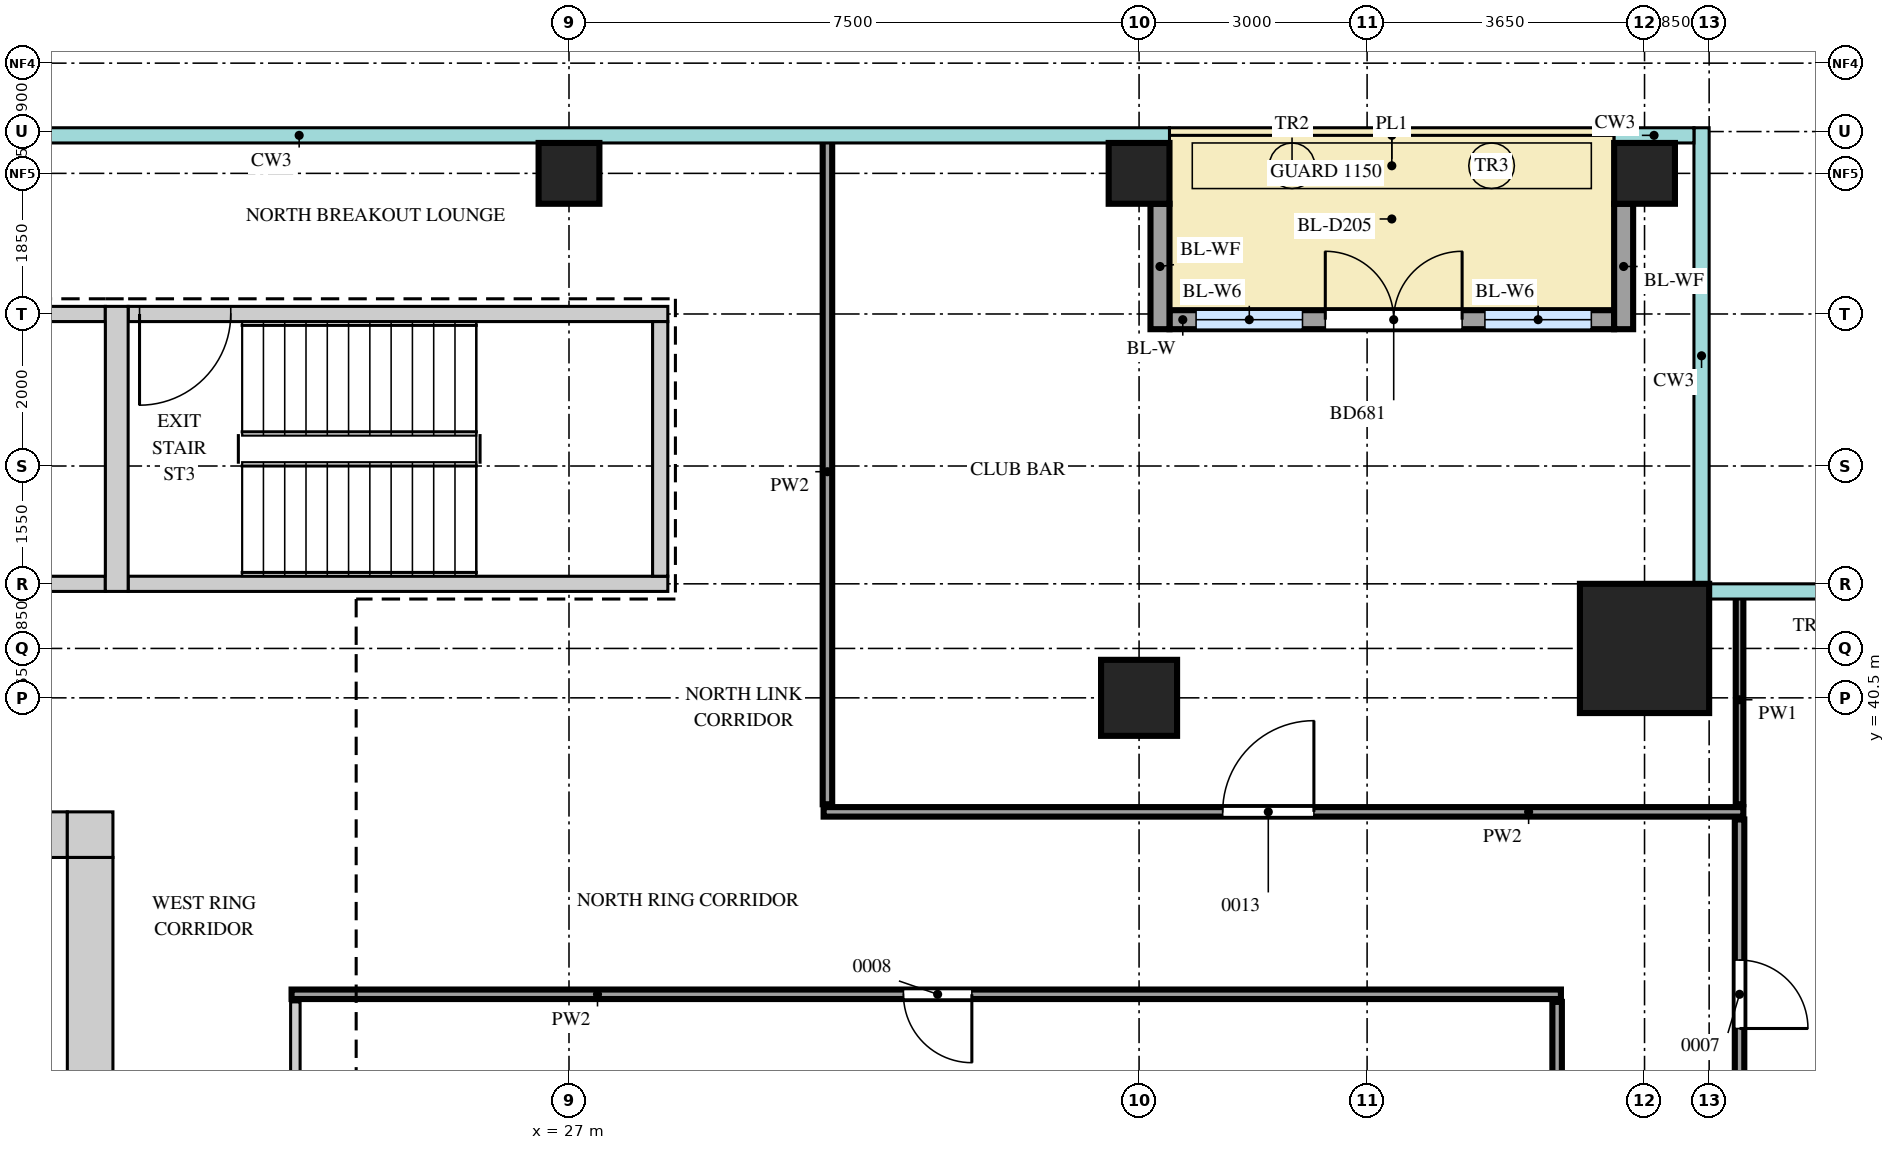
"""IFC4 building model, lengths in metres.
Left out: names, types, materials, properties, quantities, classifications, styles, units other than length and angle.
Written with IfcOpenShell. Run it as: python <this file> out.ifc"""

import sys

from ifc_helpers import new_model, si_unit, direction, frame, frame_2d, origin, origin_2d, place, context, subcontext, project, spatial, rectangle, extrude, source, transform, mapped, element, fill, save


model = new_model("IFC4")
c1 = context("Model", 3, precision=1e-05, world=origin(), true_north=direction((0.0, 1.0)))
c2 = subcontext(c1, "Body", "Model", "MODEL_VIEW")
j1 = project(units=[si_unit("LENGTHUNIT", "METRE"), si_unit("PLANEANGLEUNIT", "RADIAN")], contexts=[c1])
p1 = place(None, origin())
s1 = spatial("IfcSite", under=j1, at=p1, CompositionType="ELEMENT")
p2 = place(p1, origin())
s2 = spatial("IfcBuilding", under=s1, at=p2, CompositionType="ELEMENT")
p3 = place(p2, frame((0.0, 0.0, 302.2)))
s3 = spatial("IfcBuildingStorey", under=s2, at=p3, CompositionType="ELEMENT", Elevation=302.2)
m1 = source(origin(), c2, "Body", "SweptSolid", [
    extrude(rectangle(XDim=14.4, YDim=0.6, at=frame_2d((7.2, 0.0))), origin(), (0.0, 0.0, 1.0), 3.75),
])
p4 = place(p3, frame((6.0, 38.7, 0.0), z_axis=(0.0, 0.0, 1.0), x_axis=(1.0, 0.0, 0.0)))
e1 = element("IfcWall", 1, at=p4, inside=s3, PredefinedType="SHEAR", context=c2, shape_type="MappedRepresentation", body=[
    mapped(m1, transform((0.0, 0.0, 0.0))),
])
m2 = source(origin(), c2, "Body", "SweptSolid", [
    extrude(rectangle(XDim=0.9, YDim=2.1, at=frame_2d((0.45, 1.05))), frame((0.0, 0.31, 0.0), z_axis=(0.0, -1.0, 0.0), x_axis=(1.0, 0.0, 0.0)), (0.0, 0.0, 1.0), 0.62),
])
p5 = place(p4, frame((3.7, 0.0, 0.0)))
e2 = element("IfcOpeningElement", 2, at=p5, cuts=e1, PredefinedType="OPENING", context=c2, shape_type="MappedRepresentation", body=[
    mapped(m2, transform((0.0, 0.0, 0.0))),
])
p6 = place(p4, frame((8.7, 0.0, 0.0)))
e3 = element("IfcOpeningElement", 3, at=p6, cuts=e1, PredefinedType="OPENING", context=c2, shape_type="MappedRepresentation", body=[
    mapped(m2, transform((0.0, 0.0, 0.0))),
])
p7 = place(p4, frame((12.05, 0.0, 0.0)))
e4 = element("IfcOpeningElement", 4, at=p7, cuts=e1, PredefinedType="OPENING", context=c2, shape_type="MappedRepresentation", body=[
    mapped(m2, transform((0.0, 0.0, 0.0))),
])
m3 = source(origin(), c2, "Body", "SweptSolid", [
    extrude(rectangle(XDim=0.6, YDim=0.6, at=frame_2d((0.3, 0.0))), origin(), (0.0, 0.0, 1.0), 3.75),
])
p8 = place(p3, frame((20.4, 38.7, 0.0), z_axis=(0.0, 0.0, 1.0), x_axis=(1.0, 0.0, 0.0)))
e5 = element("IfcWall", 5, at=p8, inside=s3, PredefinedType="SHEAR", context=c2, shape_type="MappedRepresentation", body=[
    mapped(m3, transform((0.0, 0.0, 0.0))),
])
m4 = source(origin(), c2, "Body", "SweptSolid", [
    extrude(rectangle(XDim=22.8, YDim=0.6, at=frame_2d((11.4, 0.0))), origin(), (0.0, 0.0, 1.0), 3.75),
])
p9 = place(p3, frame((20.7, 15.6, 0.0), z_axis=(0.0, 0.0, 1.0), x_axis=(0.0, 1.0, 0.0)))
e6 = element("IfcWall", 6, at=p9, inside=s3, PredefinedType="SHEAR", context=c2, shape_type="MappedRepresentation", body=[
    mapped(m4, transform((0.0, 0.0, 0.0))),
])
m5 = source(origin(), c2, "Body", "SweptSolid", [
    extrude(rectangle(XDim=1.8, YDim=2.1, at=frame_2d((0.9, 1.05))), frame((0.0, 0.31, 0.0), z_axis=(0.0, -1.0, 0.0), x_axis=(1.0, 0.0, 0.0)), (0.0, 0.0, 1.0), 0.62),
])
p10 = place(p9, frame((10.9, 0.0, 0.0)))
e7 = element("IfcOpeningElement", 7, at=p10, cuts=e6, PredefinedType="OPENING", context=c2, shape_type="MappedRepresentation", body=[
    mapped(m5, transform((0.0, 0.0, 0.0))),
])
p11 = place(p9, frame((0.55, 0.0, 0.0)))
e8 = element("IfcOpeningElement", 8, at=p11, cuts=e6, PredefinedType="OPENING", context=c2, shape_type="MappedRepresentation", body=[
    mapped(m2, transform((0.0, 0.0, 0.0))),
])
p12 = place(p9, frame((4.1, 0.0, 0.0)))
e9 = element("IfcOpeningElement", 9, at=p12, cuts=e6, PredefinedType="OPENING", context=c2, shape_type="MappedRepresentation", body=[
    mapped(m2, transform((0.0, 0.0, 0.0))),
])
m6 = source(origin(), c2, "Body", "SweptSolid", [
    extrude(rectangle(XDim=7.0, YDim=0.2, at=frame_2d((3.5, 0.0))), origin(), (0.0, 0.0, 1.0), 3.75),
])
p13 = place(p3, frame((13.9, 45.55, 0.0), z_axis=(0.0, 0.0, 1.0), x_axis=(1.0, 0.0, 0.0)))
e10 = element("IfcWall", 10, at=p13, inside=s3, PredefinedType="SHEAR", context=c2, shape_type="MappedRepresentation", body=[
    mapped(m6, transform((0.0, 0.0, 0.0))),
])
m7 = source(origin(), c2, "Body", "SweptSolid", [
    extrude(rectangle(XDim=1.2, YDim=2.1, at=frame_2d((0.6, 1.05))), frame((0.0, 0.11, 0.0), z_axis=(0.0, -1.0, 0.0), x_axis=(1.0, 0.0, 0.0)), (0.0, 0.0, 1.0), 0.22),
])
p14 = place(p13, frame((0.35, 0.0, 0.0)))
e11 = element("IfcOpeningElement", 11, at=p14, cuts=e10, PredefinedType="OPENING", context=c2, shape_type="MappedRepresentation", body=[
    mapped(m7, transform((0.0, 0.0, 0.0))),
])
p15 = place(p3, frame((13.9, 42.0, 0.0), z_axis=(0.0, 0.0, 1.0), x_axis=(1.0, 0.0, 0.0)))
e12 = element("IfcWall", 12, at=p15, inside=s3, PredefinedType="SHEAR", context=c2, shape_type="MappedRepresentation", body=[
    mapped(m6, transform((0.0, 0.0, 0.0))),
])
m8 = source(origin(), c2, "Body", "SweptSolid", [
    extrude(rectangle(XDim=7.1, YDim=0.2, at=frame_2d((3.55, 0.0))), origin(), (0.0, 0.0, 1.0), 3.75),
])
p16 = place(p3, frame((21.2, 45.55, 0.0), z_axis=(0.0, 0.0, 1.0), x_axis=(1.0, 0.0, 0.0)))
e13 = element("IfcWall", 13, at=p16, inside=s3, PredefinedType="SHEAR", context=c2, shape_type="MappedRepresentation", body=[
    mapped(m8, transform((0.0, 0.0, 0.0))),
])
p17 = place(p16, frame((0.15, 0.0, 0.0)))
e14 = element("IfcOpeningElement", 14, at=p17, cuts=e13, PredefinedType="OPENING", context=c2, shape_type="MappedRepresentation", body=[
    mapped(m7, transform((0.0, 0.0, 0.0))),
])
p18 = place(p3, frame((21.2, 42.0, 0.0), z_axis=(0.0, 0.0, 1.0), x_axis=(1.0, 0.0, 0.0)))
e15 = element("IfcWall", 15, at=p18, inside=s3, PredefinedType="SHEAR", context=c2, shape_type="MappedRepresentation", body=[
    mapped(m8, transform((0.0, 0.0, 0.0))),
])
m9 = source(origin(), c2, "Body", "SweptSolid", [
    extrude(rectangle(XDim=3.75, YDim=0.3, at=frame_2d((1.875, 0.0))), origin(), (0.0, 0.0, 1.0), 3.75),
])
p19 = place(p3, frame((21.05, 41.9, 0.0), z_axis=(0.0, 0.0, 1.0), x_axis=(0.0, 1.0, 0.0)))
e16 = element("IfcWall", 16, at=p19, inside=s3, PredefinedType="SHEAR", context=c2, shape_type="MappedRepresentation", body=[
    mapped(m9, transform((0.0, 0.0, 0.0))),
])
m10 = source(origin(), c2, "Body", "SweptSolid", [
    extrude(rectangle(XDim=3.35, YDim=0.2, at=frame_2d((1.675, 0.0))), origin(), (0.0, 0.0, 1.0), 3.75),
])
p20 = place(p3, frame((28.2, 42.1, 0.0), z_axis=(0.0, 0.0, 1.0), x_axis=(0.0, 1.0, 0.0)))
e17 = element("IfcWall", 17, at=p20, inside=s3, PredefinedType="SHEAR", context=c2, shape_type="MappedRepresentation", body=[
    mapped(m10, transform((0.0, 0.0, 0.0))),
])
m11 = source(origin(), c2, "Body", "SweptSolid", [
    extrude(rectangle(XDim=1.7, YDim=1.7, at=origin_2d()), origin(), (0.0, 0.0, 1.0), 3.75),
])
p21 = place(p3, frame((41.15, 41.15, 0.0), z_axis=(0.0, 0.0, 1.0), x_axis=(1.0, 0.0, 0.0)))
e18 = element("IfcColumn", 18, at=p21, inside=s3, PredefinedType="COLUMN", context=c2, shape_type="MappedRepresentation", body=[
    mapped(m11, transform((0.0, 0.0, 0.0))),
])
m12 = source(origin(), c2, "Body", "SweptSolid", [
    extrude(rectangle(XDim=0.8, YDim=0.8, at=origin_2d()), origin(), (0.0, 0.0, 1.0), 3.75),
])
for number, where, z_axis, x_axis in (
    (19, (27.0, 47.4, 0.0), (0.0, 0.0, 1.0), (1.0, 0.0, 0.0)),
    (20, (34.5, 47.4, 0.0), (0.0, 0.0, 1.0), (1.0, 0.0, 0.0)),
    (21, (41.15, 47.4, 0.0), (0.0, 0.0, 1.0), (1.0, 0.0, 0.0)),
):
    element("IfcColumn", number, at=place(p3, frame(where, z_axis=z_axis, x_axis=x_axis)), inside=s3, PredefinedType="COLUMN", context=c2, shape_type="MappedRepresentation", body=[
        mapped(m12, transform((0.0, 0.0, 0.0))),
    ])
m13 = source(origin(), c2, "Body", "SweptSolid", [
    extrude(rectangle(XDim=1.0, YDim=1.0, at=origin_2d()), origin(), (0.0, 0.0, 1.0), 3.75),
])
p22 = place(p3, frame((34.5, 40.5, 0.0), z_axis=(0.0, 0.0, 1.0), x_axis=(1.0, 0.0, 0.0)))
e22 = element("IfcColumn", 22, at=p22, inside=s3, PredefinedType="COLUMN", context=c2, shape_type="MappedRepresentation", body=[
    mapped(m13, transform((0.0, 0.0, 0.0))),
])
m14 = source(origin(), c2, "Body", "SweptSolid", [
    extrude(rectangle(XDim=5.85, YDim=0.25, at=frame_2d((2.925, 0.0))), origin(), (0.0, 0.0, 1.0), 3.75),
])
p23 = place(p3, frame((34.9, 45.475, 0.0), z_axis=(0.0, 0.0, 1.0), x_axis=(1.0, 0.0, 0.0)))
e23 = element("IfcWall", 23, at=p23, inside=s3, PredefinedType="SOLIDWALL", context=c2, shape_type="MappedRepresentation", body=[
    mapped(m14, transform((0.0, 0.0, 0.0))),
])
m15 = source(origin(), c2, "Body", "SweptSolid", [
    extrude(rectangle(XDim=1.4, YDim=2.4, at=frame_2d((0.7, 1.2))), frame((0.0, 0.135, 0.0), z_axis=(0.0, -1.0, 0.0), x_axis=(1.0, 0.0, 0.0)), (0.0, 0.0, 1.0), 0.27),
])
p24 = place(p23, frame((0.35, 0.0, 0.0)))
e24 = element("IfcOpeningElement", 24, at=p24, cuts=e23, PredefinedType="OPENING", context=c2, shape_type="MappedRepresentation", body=[
    mapped(m15, transform((0.0, 0.0, 0.0))),
])
p25 = place(p23, frame((4.15, 0.0, 0.0)))
e25 = element("IfcOpeningElement", 25, at=p25, cuts=e23, PredefinedType="OPENING", context=c2, shape_type="MappedRepresentation", body=[
    mapped(m15, transform((0.0, 0.0, 0.0))),
])
m16 = source(origin(), c2, "Body", "SweptSolid", [
    extrude(rectangle(XDim=1.8, YDim=2.4, at=frame_2d((0.9, 1.2))), frame((0.0, 0.135, 0.0), z_axis=(0.0, -1.0, 0.0), x_axis=(1.0, 0.0, 0.0)), (0.0, 0.0, 1.0), 0.27),
])
p26 = place(p23, frame((2.05, 0.0, 0.0)))
e26 = element("IfcOpeningElement", 26, at=p26, cuts=e23, PredefinedType="OPENING", context=c2, shape_type="MappedRepresentation", body=[
    mapped(m16, transform((0.0, 0.0, 0.0))),
])
m17 = source(origin(), c2, "Body", "SweptSolid", [
    extrude(rectangle(XDim=1.65, YDim=0.25, at=frame_2d((0.825, 0.0))), origin(), (0.0, 0.0, 1.0), 3.45),
])
for number, where, z_axis, x_axis in (
    (27, (34.775, 47.0, 0.0), (0.0, 0.0, 1.0), (0.0, -1.0, 0.0)),
    (28, (40.875, 47.0, 0.0), (0.0, 0.0, 1.0), (0.0, -1.0, 0.0)),
):
    element("IfcWall", number, at=place(p3, frame(where, z_axis=z_axis, x_axis=x_axis)), inside=s3, PredefinedType="SOLIDWALL", context=c2, shape_type="MappedRepresentation", body=[
        mapped(m17, transform((0.0, 0.0, 0.0))),
    ])
m18 = source(origin(), c2, "Body", "SweptSolid", [
    extrude(rectangle(XDim=23.8, YDim=0.125, at=frame_2d((11.9, 0.0))), origin(), (0.0, 0.0, 1.0), 3.8),
])
p27 = place(p3, frame((42.4, 15.1, 0.0), z_axis=(0.0, 0.0, 1.0), x_axis=(0.0, 1.0, 0.0)))
e29 = element("IfcWall", 29, at=p27, inside=s3, PredefinedType="PARTITIONING", context=c2, shape_type="MappedRepresentation", body=[
    mapped(m18, transform((0.0, 0.0, 0.0))),
])
m19 = source(origin(), c2, "Body", "SweptSolid", [
    extrude(rectangle(XDim=0.9, YDim=2.1, at=frame_2d((0.45, 1.05))), frame((0.0, 0.073, 0.0), z_axis=(0.0, -1.0, 0.0), x_axis=(1.0, 0.0, 0.0)), (0.0, 0.0, 1.0), 0.145),
])
p28 = place(p27, frame((1.55, 0.0, 0.0)))
e30 = element("IfcOpeningElement", 30, at=p28, cuts=e29, PredefinedType="OPENING", context=c2, shape_type="MappedRepresentation", body=[
    mapped(m19, transform((0.0, 0.0, 0.0))),
])
p29 = place(p27, frame((5.55, 0.0, 0.0)))
e31 = element("IfcOpeningElement", 31, at=p29, cuts=e29, PredefinedType="OPENING", context=c2, shape_type="MappedRepresentation", body=[
    mapped(m19, transform((0.0, 0.0, 0.0))),
])
p30 = place(p27, frame((9.05, 0.0, 0.0)))
e32 = element("IfcOpeningElement", 32, at=p30, cuts=e29, PredefinedType="OPENING", context=c2, shape_type="MappedRepresentation", body=[
    mapped(m19, transform((0.0, 0.0, 0.0))),
])
m20 = source(origin(), c2, "Body", "SweptSolid", [
    extrude(rectangle(XDim=1.0, YDim=2.1, at=frame_2d((0.5, 1.05))), frame((0.0, 0.073, 0.0), z_axis=(0.0, -1.0, 0.0), x_axis=(1.0, 0.0, 0.0)), (0.0, 0.0, 1.0), 0.145),
])
p31 = place(p27, frame((12.4, 0.0, 0.0)))
e33 = element("IfcOpeningElement", 33, at=p31, cuts=e29, PredefinedType="OPENING", context=c2, shape_type="MappedRepresentation", body=[
    mapped(m20, transform((0.0, 0.0, 0.0))),
])
p32 = place(p27, frame((16.6, 0.0, 0.0)))
e34 = element("IfcOpeningElement", 34, at=p32, cuts=e29, PredefinedType="OPENING", context=c2, shape_type="MappedRepresentation", body=[
    mapped(m19, transform((0.0, 0.0, 0.0))),
])
p33 = place(p27, frame((21.05, 0.0, 0.0)))
e35 = element("IfcOpeningElement", 35, at=p33, cuts=e29, PredefinedType="OPENING", context=c2, shape_type="MappedRepresentation", body=[
    mapped(m19, transform((0.0, 0.0, 0.0))),
])
m21 = source(origin(), c2, "Body", "SweptSolid", [
    extrude(rectangle(XDim=19.0, YDim=0.125, at=frame_2d((9.5, 0.0))), origin(), (0.0, 0.0, 1.0), 3.8),
])
p34 = place(p3, frame((23.4, 17.5, 0.0), z_axis=(0.0, 0.0, 1.0), x_axis=(0.0, 1.0, 0.0)))
e36 = element("IfcWall", 36, at=p34, inside=s3, PredefinedType="PARTITIONING", context=c2, shape_type="MappedRepresentation", body=[
    mapped(m21, transform((0.0, 0.0, 0.0))),
])
p35 = place(p34, frame((8.4, 0.0, 0.0)))
e37 = element("IfcOpeningElement", 37, at=p35, cuts=e36, PredefinedType="OPENING", context=c2, shape_type="MappedRepresentation", body=[
    mapped(m19, transform((0.0, 0.0, 0.0))),
])
p36 = place(p3, frame((40.0, 17.5, 0.0), z_axis=(0.0, 0.0, 1.0), x_axis=(0.0, 1.0, 0.0)))
e38 = element("IfcWall", 38, at=p36, inside=s3, PredefinedType="PARTITIONING", context=c2, shape_type="MappedRepresentation", body=[
    mapped(m21, transform((0.0, 0.0, 0.0))),
])
m22 = source(origin(), c2, "Body", "SweptSolid", [
    extrude(rectangle(XDim=16.7, YDim=0.125, at=frame_2d((8.35, 0.0))), origin(), (0.0, 0.0, 1.0), 3.8),
])
p37 = place(p3, frame((23.35, 36.6, 0.0), z_axis=(0.0, 0.0, 1.0), x_axis=(1.0, 0.0, 0.0)))
e39 = element("IfcWall", 39, at=p37, inside=s3, PredefinedType="PARTITIONING", context=c2, shape_type="MappedRepresentation", body=[
    mapped(m22, transform((0.0, 0.0, 0.0))),
])
p38 = place(p37, frame((8.05, 0.0, 0.0)))
e40 = element("IfcOpeningElement", 40, at=p38, cuts=e39, PredefinedType="OPENING", context=c2, shape_type="MappedRepresentation", body=[
    mapped(m19, transform((0.0, 0.0, 0.0))),
])
m23 = source(origin(), c2, "Body", "SweptSolid", [
    extrude(rectangle(XDim=12.1, YDim=0.125, at=frame_2d((6.05, 0.0))), origin(), (0.0, 0.0, 1.0), 3.8),
])
p39 = place(p3, frame((30.35, 39.0, 0.0), z_axis=(0.0, 0.0, 1.0), x_axis=(1.0, 0.0, 0.0)))
e41 = element("IfcWall", 41, at=p39, inside=s3, PredefinedType="PARTITIONING", context=c2, shape_type="MappedRepresentation", body=[
    mapped(m23, transform((0.0, 0.0, 0.0))),
])
m24 = source(origin(), c2, "Body", "SweptSolid", [
    extrude(rectangle(XDim=1.2, YDim=2.1, at=frame_2d((0.6, 1.05))), frame((0.0, 0.073, 0.0), z_axis=(0.0, -1.0, 0.0), x_axis=(1.0, 0.0, 0.0)), (0.0, 0.0, 1.0), 0.145),
])
p40 = place(p39, frame((5.25, 0.0, 0.0)))
e42 = element("IfcOpeningElement", 42, at=p40, cuts=e41, PredefinedType="OPENING", context=c2, shape_type="MappedRepresentation", body=[
    mapped(m24, transform((0.0, 0.0, 0.0))),
])
m25 = source(origin(), c2, "Body", "SweptSolid", [
    extrude(rectangle(XDim=8.75, YDim=0.125, at=frame_2d((4.375, 0.0))), origin(), (0.0, 0.0, 1.0), 3.8),
])
p41 = place(p3, frame((30.4, 39.1, 0.0), z_axis=(0.0, 0.0, 1.0), x_axis=(0.0, 1.0, 0.0)))
e43 = element("IfcWall", 43, at=p41, inside=s3, PredefinedType="PARTITIONING", context=c2, shape_type="MappedRepresentation", body=[
    mapped(m25, transform((0.0, 0.0, 0.0))),
])
m26 = source(origin(), c2, "Body", "SweptSolid", [
    extrude(rectangle(XDim=2.75, YDim=0.1, at=frame_2d((1.375, 0.0))), origin(), (0.0, 0.0, 1.0), 3.8),
])
p42 = place(p3, frame((42.4, 39.1, 0.0), z_axis=(0.0, 0.0, 1.0), x_axis=(0.0, 1.0, 0.0)))
e44 = element("IfcWall", 44, at=p42, inside=s3, PredefinedType="PARTITIONING", context=c2, shape_type="MappedRepresentation", body=[
    mapped(m26, transform((0.0, 0.0, 0.0))),
])
m27 = source(origin(), c2, "Body", "SweptSolid", [
    extrude(rectangle(XDim=1.4, YDim=2.4, at=frame_2d((0.7, 1.2))), frame((0.0, 0.03, 0.0), z_axis=(0.0, -1.0, 0.0), x_axis=(1.0, 0.0, 0.0)), (0.0, 0.0, 1.0), 0.06),
])
p43 = place(p24, origin())
e45 = element("IfcWindow", 45, at=p43, inside=s3, PartitioningType="SINGLE_PANEL", PredefinedType="WINDOW", context=c2, shape_type="MappedRepresentation", body=[
    mapped(m27, transform((0.0, 0.0, 0.0))),
])
fill(e24, e45)
p44 = place(p25, origin())
e46 = element("IfcWindow", 46, at=p44, inside=s3, PartitioningType="SINGLE_PANEL", PredefinedType="WINDOW", context=c2, shape_type="MappedRepresentation", body=[
    mapped(m27, transform((0.0, 0.0, 0.0))),
])
fill(e25, e46)
m28 = source(origin(), c2, "Body", "SweptSolid", [
    extrude(rectangle(XDim=1.8, YDim=2.4, at=frame_2d((0.9, 1.2))), frame((0.0, 0.025, 0.0), z_axis=(0.0, -1.0, 0.0), x_axis=(1.0, 0.0, 0.0)), (0.0, 0.0, 1.0), 0.05),
])
p45 = place(p26, origin())
e47 = element("IfcDoor", 47, at=p45, inside=s3, OperationType="DOUBLE_DOOR_DOUBLE_SWING", PredefinedType="DOOR", context=c2, shape_type="MappedRepresentation", body=[
    mapped(m28, transform((0.0, 0.0, 0.0))),
])
fill(e26, e47)
m29 = source(origin(), c2, "Body", "SweptSolid", [
    extrude(rectangle(XDim=0.9, YDim=2.1, at=frame_2d((0.45, 1.05))), frame((0.0, 0.025, 0.0), z_axis=(0.0, -1.0, 0.0), x_axis=(1.0, 0.0, 0.0)), (0.0, 0.0, 1.0), 0.05),
])
p46 = place(p33, origin())
e48 = element("IfcDoor", 48, at=p46, inside=s3, OperationType="SINGLE_SWING_LEFT", PredefinedType="DOOR", context=c2, shape_type="MappedRepresentation", body=[
    mapped(m29, transform((0.0, 0.0, 0.0))),
])
fill(e35, e48)
m30 = source(origin(), c2, "Body", "SweptSolid", [
    extrude(rectangle(XDim=1.2, YDim=2.1, at=frame_2d((0.6, 1.05))), frame((0.0, 0.025, 0.0), z_axis=(0.0, -1.0, 0.0), x_axis=(1.0, 0.0, 0.0)), (0.0, 0.0, 1.0), 0.05),
])
p47 = place(p40, origin())
e49 = element("IfcDoor", 49, at=p47, inside=s3, OperationType="SINGLE_SWING_LEFT", PredefinedType="DOOR", context=c2, shape_type="MappedRepresentation", body=[
    mapped(m30, transform((0.0, 0.0, 0.0))),
])
fill(e42, e49)
p48 = place(p38, origin())
e50 = element("IfcDoor", 50, at=p48, inside=s3, OperationType="SINGLE_SWING_RIGHT", PredefinedType="DOOR", context=c2, shape_type="MappedRepresentation", body=[
    mapped(m29, transform((0.0, 0.0, 0.0))),
])
fill(e40, e50)
p49 = place(p17, origin())
e51 = element("IfcDoor", 51, at=p49, inside=s3, OperationType="SINGLE_SWING_LEFT", PredefinedType="DOOR", context=c2, shape_type="MappedRepresentation", body=[
    mapped(m30, transform((0.0, 0.0, 0.0))),
])
fill(e14, e51)
save(model, sys.argv[1])
